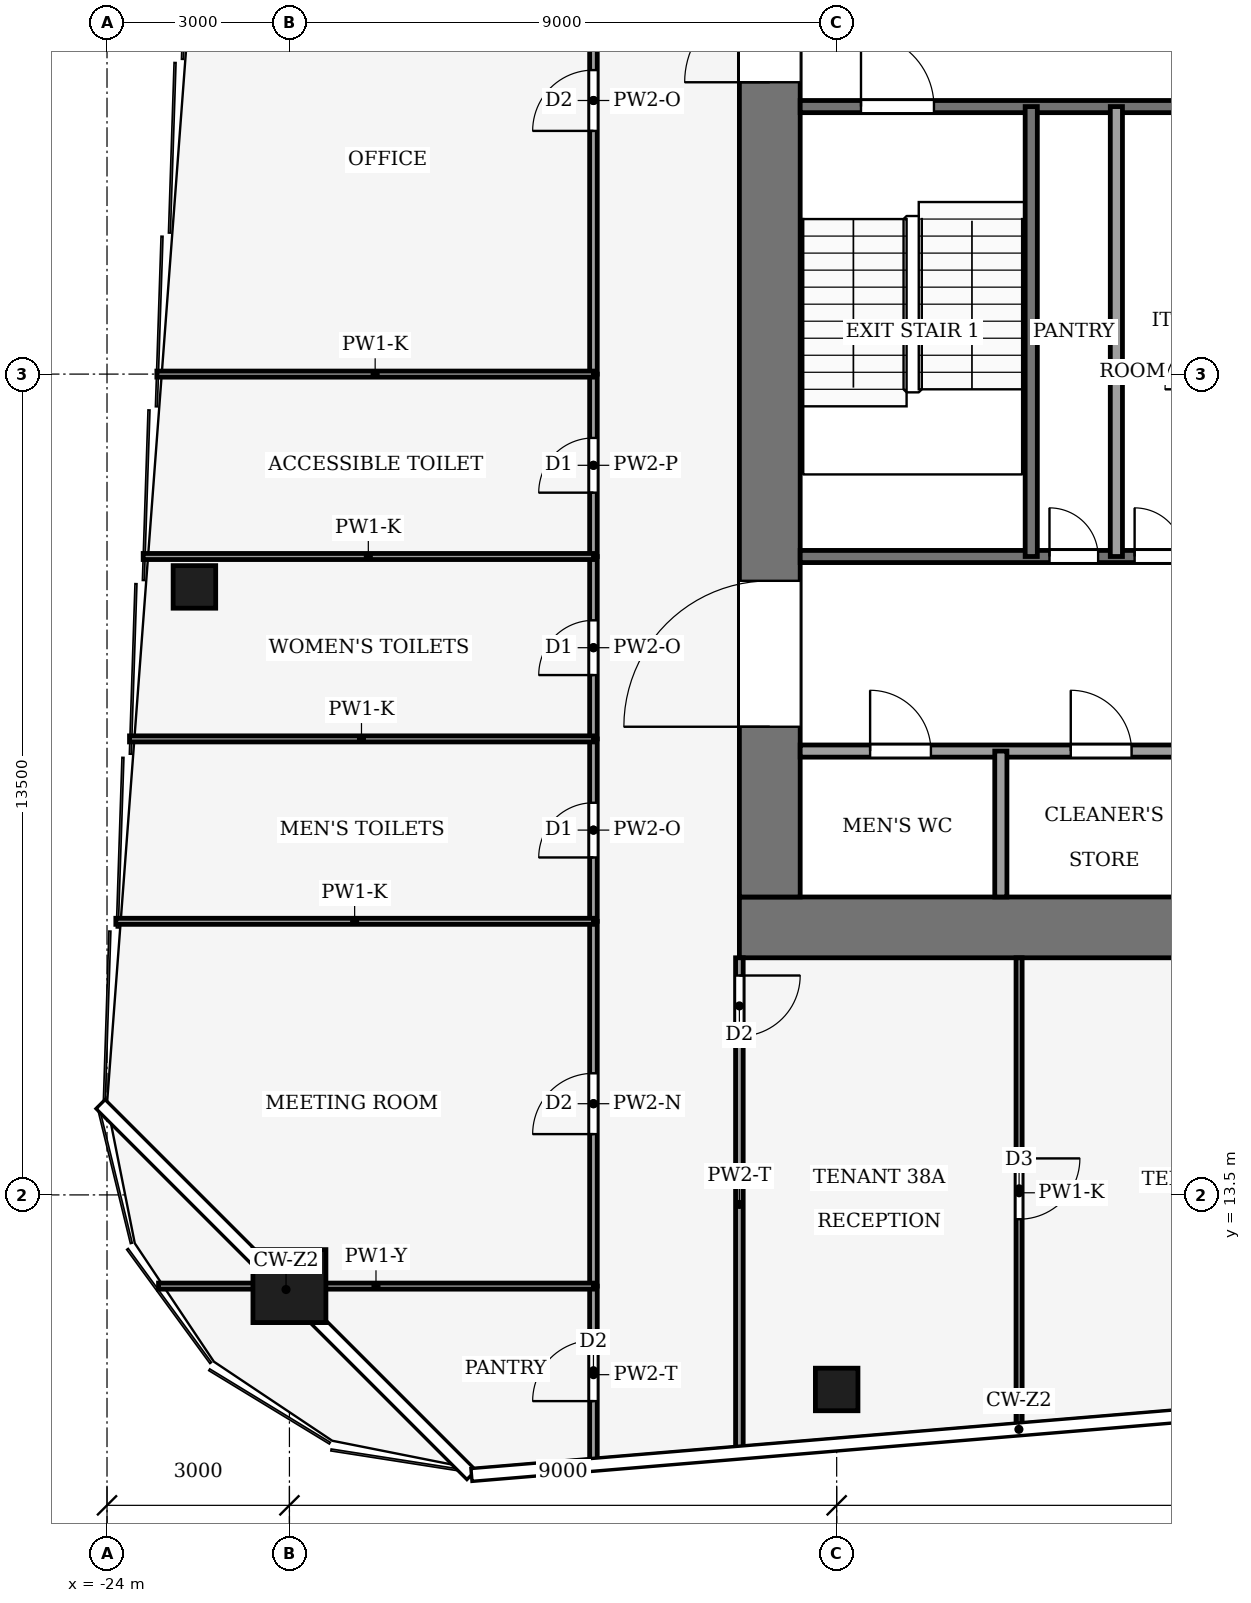
"""IFC4 building model, lengths in metres.
Left out: names, types, materials, properties, quantities, classifications, styles, units other than length and angle.
Written with IfcOpenShell. Run it as: python <this file> out.ifc"""

import sys

from ifc_helpers import new_model, si_unit, direction, frame, frame_2d, origin, origin_2d, place, context, subcontext, project, spatial, rectangle, hollow_rectangle, extrude, element, fill, save


model = new_model("IFC4")
c1 = context("Model", 3, precision=1e-05, world=origin(), true_north=direction((0.0, 1.0)))
c2 = subcontext(c1, "Body", "Model", "MODEL_VIEW")
j1 = project(units=[si_unit("LENGTHUNIT", "METRE"), si_unit("PLANEANGLEUNIT", "RADIAN")], contexts=[c1])
p1 = place(None, origin())
s1 = spatial("IfcSite", under=j1, at=p1, CompositionType="ELEMENT")
p2 = place(p1, origin())
s2 = spatial("IfcBuilding", under=s1, at=p2, CompositionType="ELEMENT")
p3 = place(p2, frame((0.0, 0.0, 166.0)))
s3 = spatial("IfcBuildingStorey", under=s2, at=p3, CompositionType="ELEMENT", Elevation=166.0)
p4 = place(p3, frame((-13.6, 17.9, -0.13), z_axis=(0.0, 0.0, 1.0), x_axis=(1.0, 0.0, 0.0)))
e1 = element("IfcWall", 1, at=p4, inside=s3, PredefinedType="SHEAR", context=c2, shape_type="SweptSolid", body=[
    extrude(rectangle(XDim=27.2, YDim=1.0, at=frame_2d((13.6, 0.0))), origin(), (0.0, 0.0, 1.0), 3.88),
])
p5 = place(p3, frame((-13.1, 18.4, -0.13), z_axis=(0.0, 0.0, 1.0), x_axis=(0.0, 1.0, 0.0)))
e2 = element("IfcWall", 2, at=p5, inside=s3, PredefinedType="SHEAR", context=c2, shape_type="SweptSolid", body=[
    extrude(rectangle(XDim=19.2, YDim=1.0, at=frame_2d((9.6, 0.0))), origin(), (0.0, 0.0, 1.0), 3.88),
])
p6 = place(p5, frame((2.8, 0.0, 0.13)))
e3 = element("IfcOpeningElement", 3, at=p6, cuts=e2, PredefinedType="OPENING", context=c2, shape_type="SweptSolid", body=[
    extrude(rectangle(XDim=2.4, YDim=2.4, at=frame_2d((1.2, 1.2))), frame((0.0, 0.51, 0.0), z_axis=(0.0, -1.0, 0.0), x_axis=(1.0, 0.0, 0.0)), (0.0, 0.0, 1.0), 1.02),
])
p7 = place(p5, frame((13.4, 0.0, 0.13)))
e4 = element("IfcOpeningElement", 4, at=p7, cuts=e2, PredefinedType="OPENING", context=c2, shape_type="SweptSolid", body=[
    extrude(rectangle(XDim=1.4, YDim=2.2, at=frame_2d((0.7, 1.1))), frame((0.0, 0.51, 0.0), z_axis=(0.0, -1.0, 0.0), x_axis=(1.0, 0.0, 0.0)), (0.0, 0.0, 1.0), 1.02),
])
p8 = place(p3, frame((-21.0, 12.0, 0.0), z_axis=(0.0, 0.0, 1.0), x_axis=(1.0, 0.0, 0.0)))
e5 = element("IfcColumn", 5, at=p8, inside=s3, PredefinedType="COLUMN", context=c2, shape_type="SweptSolid", body=[
    extrude(hollow_rectangle(XDim=1.2, YDim=1.2, WallThickness=0.07, at=origin_2d()), origin(), (0.0, 0.0, 1.0), 4.0),
])
for number, where, z_axis, x_axis in (
    (6, (-12.0, 10.3, 0.0), (0.0, 0.0, 1.0), (1.0, 0.0, 0.0)),
    (7, (-22.562, 23.5, 0.0), (0.0, 0.0, 1.0), (1.0, 0.0, 0.0)),
):
    element("IfcColumn", number, at=place(p3, frame(where, z_axis=z_axis, x_axis=x_axis)), inside=s3, PredefinedType="COLUMN", context=c2, shape_type="SweptSolid", body=[
        extrude(hollow_rectangle(XDim=0.7, YDim=0.7, WallThickness=0.03, at=origin_2d()), origin(), (0.0, 0.0, 1.0), 4.0),
    ])
p9 = place(p3, frame((-12.6, 20.8, 0.0), z_axis=(0.0, 0.0, 1.0), x_axis=(1.0, 0.0, 0.0)))
e8 = element("IfcWall", 8, at=p9, inside=s3, PredefinedType="PARTITIONING", context=c2, shape_type="SweptSolid", body=[
    extrude(rectangle(XDim=6.6, YDim=0.2, at=frame_2d((3.3, 0.0))), origin(), (0.0, 0.0, 1.0), 3.75),
])
p10 = place(p9, frame((1.15, 0.0, 0.0)))
e9 = element("IfcOpeningElement", 9, at=p10, cuts=e8, PredefinedType="OPENING", context=c2, shape_type="SweptSolid", body=[
    extrude(rectangle(XDim=1.0, YDim=2.1, at=frame_2d((0.5, 1.05))), frame((0.0, 0.11, 0.0), z_axis=(0.0, -1.0, 0.0), x_axis=(1.0, 0.0, 0.0)), (0.0, 0.0, 1.0), 0.22),
])
p11 = place(p9, frame((4.45, 0.0, 0.0)))
e10 = element("IfcOpeningElement", 10, at=p11, cuts=e8, PredefinedType="OPENING", context=c2, shape_type="SweptSolid", body=[
    extrude(rectangle(XDim=1.0, YDim=2.1, at=frame_2d((0.5, 1.05))), frame((0.0, 0.11, 0.0), z_axis=(0.0, -1.0, 0.0), x_axis=(1.0, 0.0, 0.0)), (0.0, 0.0, 1.0), 0.22),
])
p12 = place(p3, frame((-12.6, 24.0, 0.0), z_axis=(0.0, 0.0, 1.0), x_axis=(1.0, 0.0, 0.0)))
e11 = element("IfcWall", 11, at=p12, inside=s3, PredefinedType="PARTITIONING", context=c2, shape_type="SweptSolid", body=[
    extrude(rectangle(XDim=6.6, YDim=0.2, at=frame_2d((3.3, 0.0))), origin(), (0.0, 0.0, 1.0), 3.75),
])
p13 = place(p12, frame((4.1, 0.0, 0.0)))
e12 = element("IfcOpeningElement", 12, at=p13, cuts=e11, PredefinedType="OPENING", context=c2, shape_type="SweptSolid", body=[
    extrude(rectangle(XDim=0.8, YDim=2.1, at=frame_2d((0.4, 1.05))), frame((0.0, 0.11, 0.0), z_axis=(0.0, -1.0, 0.0), x_axis=(1.0, 0.0, 0.0)), (0.0, 0.0, 1.0), 0.22),
])
p14 = place(p12, frame((5.5, 0.0, 0.0)))
e13 = element("IfcOpeningElement", 13, at=p14, cuts=e11, PredefinedType="OPENING", context=c2, shape_type="SweptSolid", body=[
    extrude(rectangle(XDim=0.8, YDim=2.1, at=frame_2d((0.4, 1.05))), frame((0.0, 0.11, 0.0), z_axis=(0.0, -1.0, 0.0), x_axis=(1.0, 0.0, 0.0)), (0.0, 0.0, 1.0), 0.22),
])
p15 = place(p3, frame((-12.6, 31.4, 0.0), z_axis=(0.0, 0.0, 1.0), x_axis=(1.0, 0.0, 0.0)))
e14 = element("IfcWall", 14, at=p15, inside=s3, PredefinedType="PARTITIONING", context=c2, shape_type="SweptSolid", body=[
    extrude(rectangle(XDim=6.6, YDim=0.2, at=frame_2d((3.3, 0.0))), origin(), (0.0, 0.0, 1.0), 3.75),
])
p16 = place(p15, frame((1.0, 0.0, 0.0)))
e15 = element("IfcOpeningElement", 15, at=p16, cuts=e14, PredefinedType="OPENING", context=c2, shape_type="SweptSolid", body=[
    extrude(rectangle(XDim=1.2, YDim=2.2, at=frame_2d((0.6, 1.1))), frame((0.0, 0.11, 0.0), z_axis=(0.0, -1.0, 0.0), x_axis=(1.0, 0.0, 0.0)), (0.0, 0.0, 1.0), 0.22),
])
p17 = place(p3, frame((-9.3, 18.4, 0.0), z_axis=(0.0, 0.0, 1.0), x_axis=(0.0, 1.0, 0.0)))
e16 = element("IfcWall", 16, at=p17, inside=s3, PredefinedType="PARTITIONING", context=c2, shape_type="SweptSolid", body=[
    extrude(rectangle(XDim=2.4, YDim=0.2, at=frame_2d((1.2, 0.0))), origin(), (0.0, 0.0, 1.0), 3.75),
])
for number, where, z_axis, x_axis in (
    (17, (-8.8, 24.0, 0.0), (0.0, 0.0, 1.0), (0.0, 1.0, 0.0)),
    (18, (-7.4, 24.0, 0.0), (0.0, 0.0, 1.0), (0.0, 1.0, 0.0)),
):
    element("IfcWall", number, at=place(p3, frame(where, z_axis=z_axis, x_axis=x_axis)), inside=s3, PredefinedType="PARTITIONING", context=c2, shape_type="SweptSolid", body=[
        extrude(rectangle(XDim=7.4, YDim=0.2, at=frame_2d((3.7, 0.0))), origin(), (0.0, 0.0, 1.0), 3.75),
    ])
p18 = place(p3, frame((-16.0, 9.087, 0.0), z_axis=(0.0, 0.0, 1.0), x_axis=(0.0, 1.0, 0.0)))
e19 = element("IfcWall", 19, at=p18, inside=s3, PredefinedType="PARTITIONING", context=c2, shape_type="SweptSolid", body=[
    extrude(rectangle(XDim=2.913, YDim=0.125, at=frame_2d((1.457, 0.0))), origin(), (0.0, 0.0, 1.0), 2.92),
])
p19 = place(p18, frame((1.022, 0.0, 0.0)))
e20 = element("IfcOpeningElement", 20, at=p19, cuts=e19, PredefinedType="OPENING", context=c2, shape_type="SweptSolid", body=[
    extrude(rectangle(XDim=1.0, YDim=2.1, at=frame_2d((0.5, 1.05))), frame((0.0, 0.073, 0.0), z_axis=(0.0, -1.0, 0.0), x_axis=(1.0, 0.0, 0.0)), (0.0, 0.0, 1.0), 0.145),
])
p20 = place(p3, frame((-16.0, 12.0, 0.0), z_axis=(0.0, 0.0, 1.0), x_axis=(0.0, 1.0, 0.0)))
e21 = element("IfcWall", 21, at=p20, inside=s3, PredefinedType="PARTITIONING", context=c2, shape_type="SweptSolid", body=[
    extrude(rectangle(XDim=6.0, YDim=0.125, at=frame_2d((3.0, 0.0))), origin(), (0.0, 0.0, 1.0), 3.02),
])
p21 = place(p20, frame((2.5, 0.0, 0.0)))
e22 = element("IfcOpeningElement", 22, at=p21, cuts=e21, PredefinedType="OPENING", context=c2, shape_type="SweptSolid", body=[
    extrude(rectangle(XDim=1.0, YDim=2.1, at=frame_2d((0.5, 1.05))), frame((0.0, 0.073, 0.0), z_axis=(0.0, -1.0, 0.0), x_axis=(1.0, 0.0, 0.0)), (0.0, 0.0, 1.0), 0.145),
])
p22 = place(p3, frame((-16.0, 18.0, 0.0), z_axis=(0.0, 0.0, 1.0), x_axis=(0.0, 1.0, 0.0)))
e23 = element("IfcWall", 23, at=p22, inside=s3, PredefinedType="PARTITIONING", context=c2, shape_type="SweptSolid", body=[
    extrude(rectangle(XDim=3.0, YDim=0.125, at=frame_2d((1.5, 0.0))), origin(), (0.0, 0.0, 1.0), 3.36),
])
p23 = place(p22, frame((1.05, 0.0, 0.0)))
e24 = element("IfcOpeningElement", 24, at=p23, cuts=e23, PredefinedType="OPENING", context=c2, shape_type="SweptSolid", body=[
    extrude(rectangle(XDim=0.9, YDim=2.1, at=frame_2d((0.45, 1.05))), frame((0.0, 0.073, 0.0), z_axis=(0.0, -1.0, 0.0), x_axis=(1.0, 0.0, 0.0)), (0.0, 0.0, 1.0), 0.145),
])
p24 = place(p3, frame((-16.0, 21.0, 0.0), z_axis=(0.0, 0.0, 1.0), x_axis=(0.0, 1.0, 0.0)))
e25 = element("IfcWall", 25, at=p24, inside=s3, PredefinedType="PARTITIONING", context=c2, shape_type="SweptSolid", body=[
    extrude(rectangle(XDim=3.0, YDim=0.125, at=frame_2d((1.5, 0.0))), origin(), (0.0, 0.0, 1.0), 3.36),
])
p25 = place(p24, frame((1.05, 0.0, 0.0)))
e26 = element("IfcOpeningElement", 26, at=p25, cuts=e25, PredefinedType="OPENING", context=c2, shape_type="SweptSolid", body=[
    extrude(rectangle(XDim=0.9, YDim=2.1, at=frame_2d((0.45, 1.05))), frame((0.0, 0.073, 0.0), z_axis=(0.0, -1.0, 0.0), x_axis=(1.0, 0.0, 0.0)), (0.0, 0.0, 1.0), 0.145),
])
p26 = place(p3, frame((-16.0, 24.0, 0.0), z_axis=(0.0, 0.0, 1.0), x_axis=(0.0, 1.0, 0.0)))
e27 = element("IfcWall", 27, at=p26, inside=s3, PredefinedType="PARTITIONING", context=c2, shape_type="SweptSolid", body=[
    extrude(rectangle(XDim=3.0, YDim=0.125, at=frame_2d((1.5, 0.0))), origin(), (0.0, 0.0, 1.0), 3.75),
])
p27 = place(p26, frame((1.05, 0.0, 0.0)))
e28 = element("IfcOpeningElement", 28, at=p27, cuts=e27, PredefinedType="OPENING", context=c2, shape_type="SweptSolid", body=[
    extrude(rectangle(XDim=0.9, YDim=2.1, at=frame_2d((0.45, 1.05))), frame((0.0, 0.073, 0.0), z_axis=(0.0, -1.0, 0.0), x_axis=(1.0, 0.0, 0.0)), (0.0, 0.0, 1.0), 0.145),
])
p28 = place(p3, frame((-16.0, 27.0, 0.0), z_axis=(0.0, 0.0, 1.0), x_axis=(0.0, 1.0, 0.0)))
e29 = element("IfcWall", 29, at=p28, inside=s3, PredefinedType="PARTITIONING", context=c2, shape_type="SweptSolid", body=[
    extrude(rectangle(XDim=9.0, YDim=0.125, at=frame_2d((4.5, 0.0))), origin(), (0.0, 0.0, 1.0), 3.36),
])
p29 = place(p28, frame((4.0, 0.0, 0.0)))
e30 = element("IfcOpeningElement", 30, at=p29, cuts=e29, PredefinedType="OPENING", context=c2, shape_type="SweptSolid", body=[
    extrude(rectangle(XDim=1.0, YDim=2.1, at=frame_2d((0.5, 1.05))), frame((0.0, 0.073, 0.0), z_axis=(0.0, -1.0, 0.0), x_axis=(1.0, 0.0, 0.0)), (0.0, 0.0, 1.0), 0.145),
])
p30 = place(p3, frame((-13.6, 17.4, 0.0), z_axis=(0.0, 0.0, 1.0), x_axis=(0.0, -1.0, 0.0)))
e31 = element("IfcWall", 31, at=p30, inside=s3, PredefinedType="PARTITIONING", context=c2, shape_type="SweptSolid", body=[
    extrude(rectangle(XDim=8.113, YDim=0.125, at=frame_2d((4.057, 0.0))), origin(), (0.0, 0.0, 1.0), 2.92),
])
p31 = place(p30, frame((0.292, 0.0, 0.0)))
e32 = element("IfcOpeningElement", 32, at=p31, cuts=e31, PredefinedType="OPENING", context=c2, shape_type="SweptSolid", body=[
    extrude(rectangle(XDim=1.0, YDim=2.1, at=frame_2d((0.5, 1.05))), frame((0.0, 0.073, 0.0), z_axis=(0.0, -1.0, 0.0), x_axis=(1.0, 0.0, 0.0)), (0.0, 0.0, 1.0), 0.145),
])
p32 = place(p3, frame((-16.0, 12.0, 0.0), z_axis=(0.0, 0.0, 1.0), x_axis=(-1.0, 0.0, 0.0)))
e33 = element("IfcWall", 33, at=p32, inside=s3, PredefinedType="PARTITIONING", context=c2, shape_type="SweptSolid", body=[
    extrude(rectangle(XDim=7.153, YDim=0.1, at=frame_2d((3.576, 0.0))), origin(), (0.0, 0.0, 1.0), 2.81),
])
p33 = place(p3, frame((-16.0, 18.0, 0.0), z_axis=(0.0, 0.0, 1.0), x_axis=(-1.0, 0.0, 0.0)))
e34 = element("IfcWall", 34, at=p33, inside=s3, PredefinedType="PARTITIONING", context=c2, shape_type="SweptSolid", body=[
    extrude(rectangle(XDim=7.855, YDim=0.1, at=frame_2d((3.927, 0.0))), origin(), (0.0, 0.0, 1.0), 2.92),
])
p34 = place(p3, frame((-16.0, 21.0, 0.0), z_axis=(0.0, 0.0, 1.0), x_axis=(-1.0, 0.0, 0.0)))
e35 = element("IfcWall", 35, at=p34, inside=s3, PredefinedType="PARTITIONING", context=c2, shape_type="SweptSolid", body=[
    extrude(rectangle(XDim=7.63, YDim=0.1, at=frame_2d((3.815, 0.0))), origin(), (0.0, 0.0, 1.0), 2.92),
])
p35 = place(p3, frame((-16.0, 24.0, 0.0), z_axis=(0.0, 0.0, 1.0), x_axis=(-1.0, 0.0, 0.0)))
e36 = element("IfcWall", 36, at=p35, inside=s3, PredefinedType="PARTITIONING", context=c2, shape_type="SweptSolid", body=[
    extrude(rectangle(XDim=7.405, YDim=0.1, at=frame_2d((3.703, 0.0))), origin(), (0.0, 0.0, 1.0), 2.92),
])
p36 = place(p3, frame((-16.0, 27.0, 0.0), z_axis=(0.0, 0.0, 1.0), x_axis=(-1.0, 0.0, 0.0)))
e37 = element("IfcWall", 37, at=p36, inside=s3, PredefinedType="PARTITIONING", context=c2, shape_type="SweptSolid", body=[
    extrude(rectangle(XDim=7.18, YDim=0.1, at=frame_2d((3.59, 0.0))), origin(), (0.0, 0.0, 1.0), 2.92),
])
p37 = place(p3, frame((-9.0, 17.4, 0.0), z_axis=(0.0, 0.0, 1.0), x_axis=(0.0, -1.0, 0.0)))
e38 = element("IfcWall", 38, at=p37, inside=s3, PredefinedType="PARTITIONING", context=c2, shape_type="SweptSolid", body=[
    extrude(rectangle(XDim=7.73, YDim=0.1, at=frame_2d((3.865, 0.0))), origin(), (0.0, 0.0, 1.0), 2.92),
])
p38 = place(p37, frame((3.3, 0.0, 0.0)))
e39 = element("IfcOpeningElement", 39, at=p38, cuts=e38, PredefinedType="OPENING", context=c2, shape_type="SweptSolid", body=[
    extrude(rectangle(XDim=1.0, YDim=2.1, at=frame_2d((0.5, 1.05))), frame((0.0, 0.06, 0.0), z_axis=(0.0, -1.0, 0.0), x_axis=(1.0, 0.0, 0.0)), (0.0, 0.0, 1.0), 0.12),
])
p39 = place(p10, origin())
e40 = element("IfcDoor", 40, at=p39, inside=s3, OperationType="SINGLE_SWING_LEFT", PredefinedType="DOOR", context=c2, shape_type="SweptSolid", body=[
    extrude(rectangle(XDim=1.0, YDim=2.1, at=frame_2d((0.5, 1.05))), frame((0.0, 0.025, 0.0), z_axis=(0.0, -1.0, 0.0), x_axis=(1.0, 0.0, 0.0)), (0.0, 0.0, 1.0), 0.05),
])
fill(e9, e40)
p40 = place(p11, origin())
e41 = element("IfcDoor", 41, at=p40, inside=s3, OperationType="SINGLE_SWING_LEFT", PredefinedType="DOOR", context=c2, shape_type="SweptSolid", body=[
    extrude(rectangle(XDim=1.0, YDim=2.1, at=frame_2d((0.5, 1.05))), frame((0.0, 0.025, 0.0), z_axis=(0.0, -1.0, 0.0), x_axis=(1.0, 0.0, 0.0)), (0.0, 0.0, 1.0), 0.05),
])
fill(e10, e41)
p41 = place(p13, origin())
e42 = element("IfcDoor", 42, at=p41, inside=s3, OperationType="SINGLE_SWING_LEFT", PredefinedType="DOOR", context=c2, shape_type="SweptSolid", body=[
    extrude(rectangle(XDim=0.8, YDim=2.1, at=frame_2d((0.4, 1.05))), frame((0.0, 0.025, 0.0), z_axis=(0.0, -1.0, 0.0), x_axis=(1.0, 0.0, 0.0)), (0.0, 0.0, 1.0), 0.05),
])
fill(e12, e42)
p42 = place(p14, origin())
e43 = element("IfcDoor", 43, at=p42, inside=s3, OperationType="SINGLE_SWING_RIGHT", PredefinedType="DOOR", context=c2, shape_type="SweptSolid", body=[
    extrude(rectangle(XDim=0.8, YDim=2.1, at=frame_2d((0.4, 1.05))), frame((0.0, 0.025, 0.0), z_axis=(0.0, -1.0, 0.0), x_axis=(1.0, 0.0, 0.0)), (0.0, 0.0, 1.0), 0.05),
])
fill(e13, e43)
p43 = place(p16, origin())
e44 = element("IfcDoor", 44, at=p43, inside=s3, OperationType="SINGLE_SWING_RIGHT", PredefinedType="DOOR", context=c2, shape_type="SweptSolid", body=[
    extrude(rectangle(XDim=1.2, YDim=2.2, at=frame_2d((0.6, 1.1))), frame((0.0, 0.025, 0.0), z_axis=(0.0, -1.0, 0.0), x_axis=(1.0, 0.0, 0.0)), (0.0, 0.0, 1.0), 0.05),
])
fill(e15, e44)
p44 = place(p6, origin())
e45 = element("IfcDoor", 45, at=p44, inside=s3, OperationType="DOUBLE_DOOR_SINGLE_SWING", PredefinedType="DOOR", context=c2, shape_type="SweptSolid", body=[
    extrude(rectangle(XDim=2.4, YDim=2.4, at=frame_2d((1.2, 1.2))), frame((0.0, 0.025, 0.0), z_axis=(0.0, -1.0, 0.0), x_axis=(1.0, 0.0, 0.0)), (0.0, 0.0, 1.0), 0.05),
])
fill(e3, e45)
p45 = place(p7, origin())
e46 = element("IfcDoor", 46, at=p45, inside=s3, OperationType="SINGLE_SWING_RIGHT", PredefinedType="DOOR", context=c2, shape_type="SweptSolid", body=[
    extrude(rectangle(XDim=1.4, YDim=2.2, at=frame_2d((0.7, 1.1))), frame((0.0, 0.025, 0.0), z_axis=(0.0, -1.0, 0.0), x_axis=(1.0, 0.0, 0.0)), (0.0, 0.0, 1.0), 0.05),
])
fill(e4, e46)
p46 = place(p19, origin())
e47 = element("IfcDoor", 47, at=p46, inside=s3, OperationType="SINGLE_SWING_RIGHT", PredefinedType="DOOR", context=c2, shape_type="SweptSolid", body=[
    extrude(rectangle(XDim=1.0, YDim=2.1, at=frame_2d((0.5, 1.05))), frame((0.0, 0.025, 0.0), z_axis=(0.0, -1.0, 0.0), x_axis=(1.0, 0.0, 0.0)), (0.0, 0.0, 1.0), 0.05),
])
fill(e20, e47)
p47 = place(p21, origin())
e48 = element("IfcDoor", 48, at=p47, inside=s3, OperationType="SINGLE_SWING_RIGHT", PredefinedType="DOOR", context=c2, shape_type="SweptSolid", body=[
    extrude(rectangle(XDim=1.0, YDim=2.1, at=frame_2d((0.5, 1.05))), frame((0.0, 0.025, 0.0), z_axis=(0.0, -1.0, 0.0), x_axis=(1.0, 0.0, 0.0)), (0.0, 0.0, 1.0), 0.05),
])
fill(e22, e48)
p48 = place(p23, origin())
e49 = element("IfcDoor", 49, at=p48, inside=s3, OperationType="SINGLE_SWING_LEFT", PredefinedType="DOOR", context=c2, shape_type="SweptSolid", body=[
    extrude(rectangle(XDim=0.9, YDim=2.1, at=frame_2d((0.45, 1.05))), frame((0.0, 0.025, 0.0), z_axis=(0.0, -1.0, 0.0), x_axis=(1.0, 0.0, 0.0)), (0.0, 0.0, 1.0), 0.05),
])
fill(e24, e49)
p49 = place(p25, origin())
e50 = element("IfcDoor", 50, at=p49, inside=s3, OperationType="SINGLE_SWING_RIGHT", PredefinedType="DOOR", context=c2, shape_type="SweptSolid", body=[
    extrude(rectangle(XDim=0.9, YDim=2.1, at=frame_2d((0.45, 1.05))), frame((0.0, 0.025, 0.0), z_axis=(0.0, -1.0, 0.0), x_axis=(1.0, 0.0, 0.0)), (0.0, 0.0, 1.0), 0.05),
])
fill(e26, e50)
p50 = place(p27, origin())
e51 = element("IfcDoor", 51, at=p50, inside=s3, OperationType="SINGLE_SWING_LEFT", PredefinedType="DOOR", context=c2, shape_type="SweptSolid", body=[
    extrude(rectangle(XDim=0.9, YDim=2.1, at=frame_2d((0.45, 1.05))), frame((0.0, 0.025, 0.0), z_axis=(0.0, -1.0, 0.0), x_axis=(1.0, 0.0, 0.0)), (0.0, 0.0, 1.0), 0.05),
])
fill(e28, e51)
p51 = place(p29, origin())
e52 = element("IfcDoor", 52, at=p51, inside=s3, OperationType="SINGLE_SWING_RIGHT", PredefinedType="DOOR", context=c2, shape_type="SweptSolid", body=[
    extrude(rectangle(XDim=1.0, YDim=2.1, at=frame_2d((0.5, 1.05))), frame((0.0, 0.025, 0.0), z_axis=(0.0, -1.0, 0.0), x_axis=(1.0, 0.0, 0.0)), (0.0, 0.0, 1.0), 0.05),
])
fill(e30, e52)
p52 = place(p31, origin())
e53 = element("IfcDoor", 53, at=p52, inside=s3, OperationType="SINGLE_SWING_LEFT", PredefinedType="DOOR", context=c2, shape_type="SweptSolid", body=[
    extrude(rectangle(XDim=1.0, YDim=2.1, at=frame_2d((0.5, 1.05))), frame((0.0, 0.025, 0.0), z_axis=(0.0, -1.0, 0.0), x_axis=(1.0, 0.0, 0.0)), (0.0, 0.0, 1.0), 0.05),
])
fill(e32, e53)
p53 = place(p38, origin())
e54 = element("IfcDoor", 54, at=p53, inside=s3, OperationType="SINGLE_SWING_LEFT", PredefinedType="DOOR", context=c2, shape_type="SweptSolid", body=[
    extrude(rectangle(XDim=1.0, YDim=2.1, at=frame_2d((0.5, 1.05))), frame((0.0, 0.025, 0.0), z_axis=(0.0, -1.0, 0.0), x_axis=(1.0, 0.0, 0.0)), (0.0, 0.0, 1.0), 0.05),
])
fill(e39, e54)
save(model, sys.argv[1])
